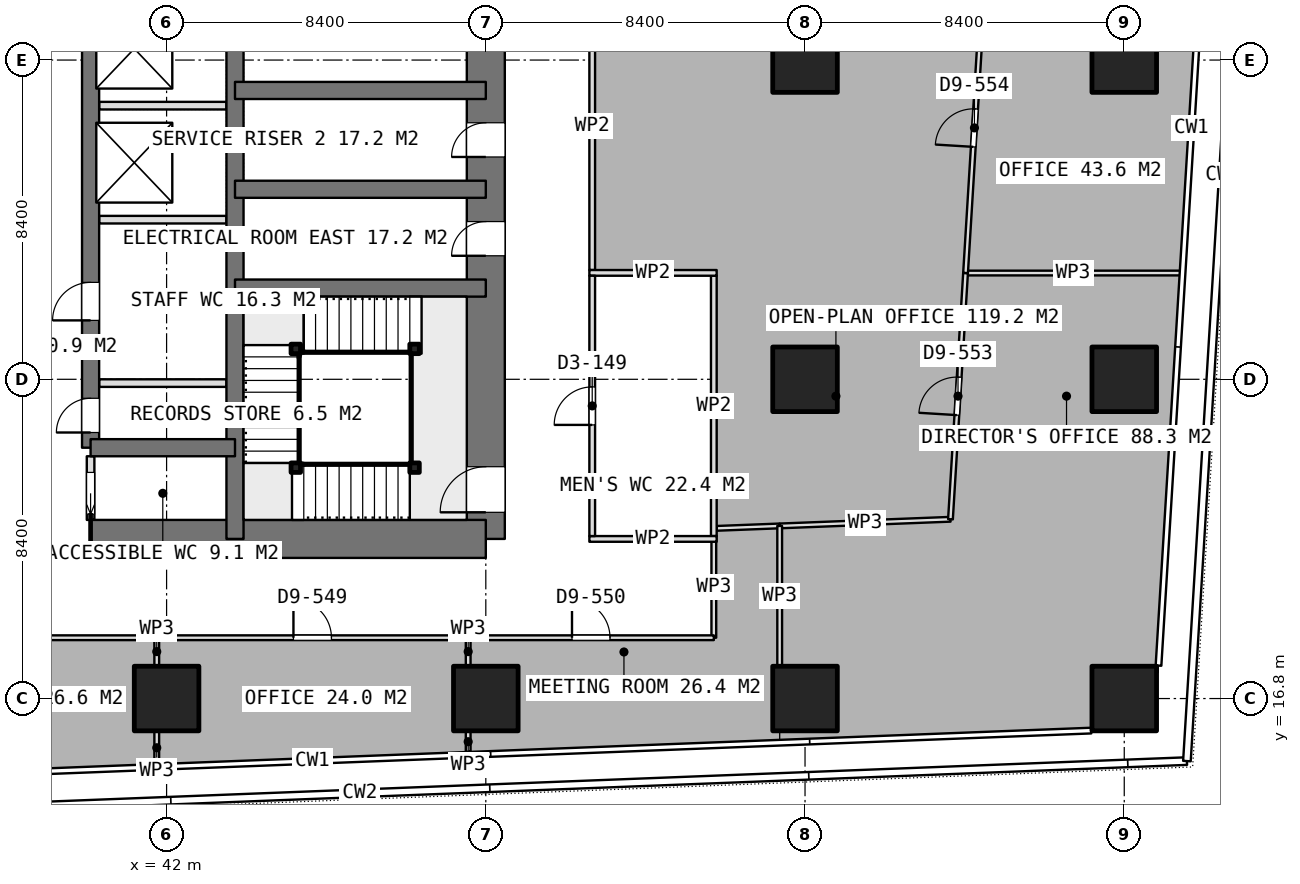
"""IFC4 building model, lengths in metres.
Left out: names, types, materials, properties, quantities, classifications, styles, units other than length and angle.
Written with IfcOpenShell. Run it as: python <this file> out.ifc"""

import sys

from ifc_helpers import new_model, si_unit, direction, frame, frame_2d, origin, origin_2d, place, context, subcontext, project, spatial, rectangle, extrude, element, fill, save


model = new_model("IFC4")
c1 = context("Model", 3, precision=1e-05, world=origin(), true_north=direction((0.0, 1.0)))
c2 = subcontext(c1, "Body", "Model", "MODEL_VIEW")
j1 = project(units=[si_unit("LENGTHUNIT", "METRE"), si_unit("PLANEANGLEUNIT", "RADIAN")], contexts=[c1])
p1 = place(None, origin())
s1 = spatial("IfcSite", under=j1, at=p1, CompositionType="ELEMENT")
p2 = place(p1, origin())
s2 = spatial("IfcBuilding", under=s1, at=p2, CompositionType="ELEMENT")
p3 = place(p2, frame((0.0, 0.0, 140.3)))
s3 = spatial("IfcBuildingStorey", under=s2, at=p3, CompositionType="ELEMENT", Elevation=140.3)
p4 = place(p3, frame((40.0, 21.0, 0.0), z_axis=(0.0, 0.0, 1.0), x_axis=(1.0, 0.0, 0.0)))
e1 = element("IfcWall", 1, at=p4, inside=s3, PredefinedType="SHEAR", context=c2, shape_type="SweptSolid", body=[
    extrude(rectangle(XDim=10.4, YDim=1.0, at=frame_2d((5.2, 0.0))), origin(), (0.0, 0.0, 1.0), 3.75),
])
p5 = place(p3, frame((50.4, 21.0, 0.0), z_axis=(0.0, 0.0, 1.0), x_axis=(0.0, 1.0, 0.0)))
e2 = element("IfcWall", 2, at=p5, inside=s3, PredefinedType="SHEAR", context=c2, shape_type="SweptSolid", body=[
    extrude(rectangle(XDim=25.2, YDim=1.0, at=frame_2d((12.6, 0.0))), origin(), (0.0, 0.0, 1.0), 3.75),
])
p6 = place(p5, frame((16.2, 0.0, 0.0)))
e3 = element("IfcOpeningElement", 3, at=p6, cuts=e2, PredefinedType="OPENING", context=c2, shape_type="SweptSolid", body=[
    extrude(rectangle(XDim=1.2, YDim=2.1, at=frame_2d((0.6, 1.05))), frame((0.0, 0.51, 0.0), z_axis=(0.0, -1.0, 0.0), x_axis=(1.0, 0.0, 0.0)), (0.0, 0.0, 1.0), 1.02),
])
p7 = place(p5, frame((10.05, 0.0, 0.0)))
e4 = element("IfcOpeningElement", 4, at=p7, cuts=e2, PredefinedType="OPENING", context=c2, shape_type="SweptSolid", body=[
    extrude(rectangle(XDim=0.9, YDim=2.1, at=frame_2d((0.45, 1.05))), frame((0.0, 0.51, 0.0), z_axis=(0.0, -1.0, 0.0), x_axis=(1.0, 0.0, 0.0)), (0.0, 0.0, 1.0), 1.02),
])
p8 = place(p5, frame((7.45, 0.0, 0.0)))
e5 = element("IfcOpeningElement", 5, at=p8, cuts=e2, PredefinedType="OPENING", context=c2, shape_type="SweptSolid", body=[
    extrude(rectangle(XDim=0.9, YDim=2.1, at=frame_2d((0.45, 1.05))), frame((0.0, 0.51, 0.0), z_axis=(0.0, -1.0, 0.0), x_axis=(1.0, 0.0, 0.0)), (0.0, 0.0, 1.0), 1.02),
])
p9 = place(p5, frame((0.7, 0.0, 0.0)))
e6 = element("IfcOpeningElement", 6, at=p9, cuts=e2, PredefinedType="OPENING", context=c2, shape_type="SweptSolid", body=[
    extrude(rectangle(XDim=1.2, YDim=2.1, at=frame_2d((0.6, 1.05))), frame((0.0, 0.51, 0.0), z_axis=(0.0, -1.0, 0.0), x_axis=(1.0, 0.0, 0.0)), (0.0, 0.0, 1.0), 1.02),
])
p10 = place(p3, frame((43.8, 21.0, 0.0), z_axis=(0.0, 0.0, 1.0), x_axis=(0.0, 1.0, 0.0)))
e7 = element("IfcWall", 7, at=p10, inside=s3, PredefinedType="SHEAR", context=c2, shape_type="SweptSolid", body=[
    extrude(rectangle(XDim=25.2, YDim=0.45, at=frame_2d((12.6, 0.0))), origin(), (0.0, 0.0, 1.0), 3.75),
])
p11 = place(p3, frame((40.0, 23.4, 0.0), z_axis=(0.0, 0.0, 1.0), x_axis=(0.0, 1.0, 0.0)))
e8 = element("IfcWall", 8, at=p11, inside=s3, PredefinedType="SHEAR", context=c2, shape_type="SweptSolid", body=[
    extrude(rectangle(XDim=18.0, YDim=0.45, at=frame_2d((9.0, 0.0))), origin(), (0.0, 0.0, 1.0), 3.75),
])
p12 = place(p11, frame((0.4, 0.0, 0.0)))
e9 = element("IfcOpeningElement", 9, at=p12, cuts=e8, PredefinedType="OPENING", context=c2, shape_type="SweptSolid", body=[
    extrude(rectangle(XDim=0.9, YDim=2.1, at=frame_2d((0.45, 1.05))), frame((0.0, 0.235, 0.0), z_axis=(0.0, -1.0, 0.0), x_axis=(1.0, 0.0, 0.0)), (0.0, 0.0, 1.0), 0.47),
])
p13 = place(p11, frame((3.35, 0.0, 0.0)))
e10 = element("IfcOpeningElement", 10, at=p13, cuts=e8, PredefinedType="OPENING", context=c2, shape_type="SweptSolid", body=[
    extrude(rectangle(XDim=1.0, YDim=2.1, at=frame_2d((0.5, 1.05))), frame((0.0, 0.235, 0.0), z_axis=(0.0, -1.0, 0.0), x_axis=(1.0, 0.0, 0.0)), (0.0, 0.0, 1.0), 0.47),
])
p14 = place(p3, frame((40.0, 23.4, 0.0), z_axis=(0.0, 0.0, 1.0), x_axis=(1.0, 0.0, 0.0)))
e11 = element("IfcWall", 11, at=p14, inside=s3, PredefinedType="SHEAR", context=c2, shape_type="SweptSolid", body=[
    extrude(rectangle(XDim=3.8, YDim=0.45, at=frame_2d((1.9, 0.0))), origin(), (0.0, 0.0, 1.0), 3.75),
])
for number, where, z_axis, x_axis in (
    (12, (43.8, 27.6, 0.0), (0.0, 0.0, 1.0), (1.0, 0.0, 0.0)),
    (13, (43.8, 30.2, 0.0), (0.0, 0.0, 1.0), (1.0, 0.0, 0.0)),
    (14, (43.8, 32.8, 0.0), (0.0, 0.0, 1.0), (1.0, 0.0, 0.0)),
):
    element("IfcWall", number, at=place(p3, frame(where, z_axis=z_axis, x_axis=x_axis)), inside=s3, PredefinedType="SHEAR", context=c2, shape_type="SweptSolid", body=[
        extrude(rectangle(XDim=6.6, YDim=0.45, at=frame_2d((3.3, 0.0))), origin(), (0.0, 0.0, 1.0), 3.75),
    ])
for number, where, z_axis, x_axis in (
    (15, (42.0, 16.8, 0.0), (0.0, 0.0, 1.0), (1.0, 0.0, 0.0)),
    (16, (50.4, 16.8, 0.0), (0.0, 0.0, 1.0), (1.0, 0.0, 0.0)),
    (17, (58.8, 16.8, 0.0), (0.0, 0.0, 1.0), (1.0, 0.0, 0.0)),
    (18, (58.8, 25.2, 0.0), (0.0, 0.0, 1.0), (1.0, 0.0, 0.0)),
    (19, (58.8, 33.6, 0.0), (0.0, 0.0, 1.0), (1.0, 0.0, 0.0)),
    (20, (67.2, 16.8, 0.0), (0.0, 0.0, 1.0), (1.0, 0.0, 0.0)),
    (21, (67.2, 25.2, 0.0), (0.0, 0.0, 1.0), (1.0, 0.0, 0.0)),
    (22, (67.2, 33.6, 0.0), (0.0, 0.0, 1.0), (1.0, 0.0, 0.0)),
):
    element("IfcColumn", number, at=place(p3, frame(where, z_axis=z_axis, x_axis=x_axis)), inside=s3, PredefinedType="COLUMN", context=c2, shape_type="SweptSolid", body=[
        extrude(rectangle(XDim=1.7, YDim=1.7, at=origin_2d()), origin(), (0.0, 0.0, 1.0), 3.75),
    ])
for number, where, z_axis, x_axis in (
    (23, (40.225, 29.4, 0.0), (0.0, 0.0, 1.0), (1.0, 0.0, 0.0)),
    (24, (40.225, 32.4, 0.0), (0.0, 0.0, 1.0), (1.0, 0.0, 0.0)),
):
    element("IfcWall", number, at=place(p3, frame(where, z_axis=z_axis, x_axis=x_axis)), inside=s3, PredefinedType="PARTITIONING", context=c2, shape_type="SweptSolid", body=[
        extrude(rectangle(XDim=3.35, YDim=0.2, at=frame_2d((1.675, 0.0))), origin(), (0.0, 0.0, 1.0), 3.5),
    ])
p15 = place(p3, frame((40.0, 21.5, 0.0), z_axis=(0.0, 0.0, 1.0), x_axis=(0.0, 1.0, 0.0)))
e25 = element("IfcWall", 25, at=p15, inside=s3, PredefinedType="PARTITIONING", context=c2, shape_type="SweptSolid", body=[
    extrude(rectangle(XDim=1.675, YDim=0.2, at=frame_2d((0.837, 0.0))), origin(), (0.0, 0.0, 1.0), 3.5),
])
p16 = place(p15, frame((0.15, 0.0, 0.0)))
e26 = element("IfcOpeningElement", 26, at=p16, cuts=e25, PredefinedType="OPENING", context=c2, shape_type="SweptSolid", body=[
    extrude(rectangle(XDim=1.1, YDim=2.1, at=frame_2d((0.55, 1.05))), frame((0.0, 0.11, 0.0), z_axis=(0.0, -1.0, 0.0), x_axis=(1.0, 0.0, 0.0)), (0.0, 0.0, 1.0), 0.22),
])
p17 = place(p3, frame((40.225, 25.1, 0.0), z_axis=(0.0, 0.0, 1.0), x_axis=(1.0, 0.0, 0.0)))
e27 = element("IfcWall", 27, at=p17, inside=s3, PredefinedType="PARTITIONING", context=c2, shape_type="SweptSolid", body=[
    extrude(rectangle(XDim=3.35, YDim=0.2, at=frame_2d((1.675, 0.0))), origin(), (0.0, 0.0, 1.0), 3.5),
])
for number, where, z_axis, x_axis in (
    (28, (53.125, 21.0, 0.0), (0.0, 0.0, 1.0), (1.0, 0.0, 0.0)),
    (29, (53.125, 28.0, 0.0), (0.0, 0.0, 1.0), (1.0, 0.0, 0.0)),
):
    element("IfcWall", number, at=place(p3, frame(where, z_axis=z_axis, x_axis=x_axis)), inside=s3, PredefinedType="PARTITIONING", context=c2, shape_type="SweptSolid", body=[
        extrude(rectangle(XDim=3.35, YDim=0.15, at=frame_2d((1.675, 0.0))), origin(), (0.0, 0.0, 1.0), 3.5),
    ])
p18 = place(p3, frame((53.2, 21.075, 0.0), z_axis=(0.0, 0.0, 1.0), x_axis=(0.0, 1.0, 0.0)))
e30 = element("IfcWall", 30, at=p18, inside=s3, PredefinedType="PARTITIONING", context=c2, shape_type="SweptSolid", body=[
    extrude(rectangle(XDim=6.85, YDim=0.15, at=frame_2d((3.425, 0.0))), origin(), (0.0, 0.0, 1.0), 3.5),
])
p19 = place(p18, frame((2.925, 0.0, 0.0)))
e31 = element("IfcOpeningElement", 31, at=p19, cuts=e30, PredefinedType="OPENING", context=c2, shape_type="SweptSolid", body=[
    extrude(rectangle(XDim=1.0, YDim=2.1, at=frame_2d((0.5, 1.05))), frame((0.0, 0.085, 0.0), z_axis=(0.0, -1.0, 0.0), x_axis=(1.0, 0.0, 0.0)), (0.0, 0.0, 1.0), 0.17),
])
p20 = place(p3, frame((56.4, 21.075, 0.0), z_axis=(0.0, 0.0, 1.0), x_axis=(0.0, 1.0, 0.0)))
e32 = element("IfcWall", 32, at=p20, inside=s3, PredefinedType="PARTITIONING", context=c2, shape_type="SweptSolid", body=[
    extrude(rectangle(XDim=6.85, YDim=0.15, at=frame_2d((3.425, 0.0))), origin(), (0.0, 0.0, 1.0), 3.5),
])
p21 = place(p3, frame((41.741, 15.08, 0.0), z_axis=(0.0, 0.0, 1.0), x_axis=(0.0, 1.0, 0.0)))
e33 = element("IfcWall", 33, at=p21, inside=s3, PredefinedType="PARTITIONING", context=c2, shape_type="SweptSolid", body=[
    extrude(rectangle(XDim=0.85, YDim=0.125, at=frame_2d((0.425, 0.0))), origin(), (0.0, 0.0, 1.0), 3.5),
])
p22 = place(p3, frame((41.741, 17.67, 0.0), z_axis=(0.0, 0.0, 1.0), x_axis=(0.0, 1.0, 0.0)))
e34 = element("IfcWall", 34, at=p22, inside=s3, PredefinedType="PARTITIONING", context=c2, shape_type="SweptSolid", body=[
    extrude(rectangle(XDim=0.73, YDim=0.125, at=frame_2d((0.365, 0.0))), origin(), (0.0, 0.0, 1.0), 3.5),
])
p23 = place(p3, frame((41.741, 18.4, 0.0), z_axis=(0.0, 0.0, 1.0), x_axis=(1.0, 0.0, 0.0)))
e35 = element("IfcWall", 35, at=p23, inside=s3, PredefinedType="PARTITIONING", context=c2, shape_type="SweptSolid", body=[
    extrude(rectangle(XDim=8.195, YDim=0.125, at=frame_2d((4.098, 0.0))), origin(), (0.0, 0.0, 1.0), 3.5),
])
p24 = place(p23, frame((3.597, 0.0, 0.0)))
e36 = element("IfcOpeningElement", 36, at=p24, cuts=e35, PredefinedType="OPENING", context=c2, shape_type="SweptSolid", body=[
    extrude(rectangle(XDim=1.0, YDim=2.1, at=frame_2d((0.5, 1.05))), frame((0.0, 0.073, 0.0), z_axis=(0.0, -1.0, 0.0), x_axis=(1.0, 0.0, 0.0)), (0.0, 0.0, 1.0), 0.145),
])
p25 = place(p3, frame((49.936, 18.4, 0.0), z_axis=(0.0, 0.0, 1.0), x_axis=(0.0, -1.0, 0.0)))
e37 = element("IfcWall", 37, at=p25, inside=s3, PredefinedType="PARTITIONING", context=c2, shape_type="SweptSolid", body=[
    extrude(rectangle(XDim=0.73, YDim=0.125, at=frame_2d((0.365, 0.0))), origin(), (0.0, 0.0, 1.0), 3.5),
])
p26 = place(p3, frame((49.936, 15.93, 0.0), z_axis=(0.0, 0.0, 1.0), x_axis=(0.0, -1.0, 0.0)))
e38 = element("IfcWall", 38, at=p26, inside=s3, PredefinedType="PARTITIONING", context=c2, shape_type="SweptSolid", body=[
    extrude(rectangle(XDim=0.531, YDim=0.125, at=frame_2d((0.266, 0.0))), origin(), (0.0, 0.0, 1.0), 3.5),
])
p27 = place(p3, frame((56.475, 21.278, 0.0), z_axis=(0.0, 0.0, 1.0), x_axis=(0.999256603287, 0.038551793559, 0.0)))
e39 = element("IfcWall", 39, at=p27, inside=s3, PredefinedType="PARTITIONING", context=c2, shape_type="SweptSolid", body=[
    extrude(rectangle(XDim=1.659, YDim=0.125, at=frame_2d((0.83, 0.0))), origin(), (0.0, 0.0, 1.0), 3.5),
])
p28 = place(p3, frame((58.133, 21.342, 0.0), z_axis=(0.0, 0.0, 1.0), x_axis=(0.0, -1.0, 0.0)))
e40 = element("IfcWall", 40, at=p28, inside=s3, PredefinedType="PARTITIONING", context=c2, shape_type="SweptSolid", body=[
    extrude(rectangle(XDim=3.672, YDim=0.125, at=frame_2d((1.836, 0.0))), origin(), (0.0, 0.0, 1.0), 3.5),
])
p29 = place(p3, frame((49.937, 18.4, 0.0), z_axis=(0.0, 0.0, 1.0), x_axis=(1.0, 0.0, 0.0)))
e41 = element("IfcWall", 41, at=p29, inside=s3, PredefinedType="PARTITIONING", context=c2, shape_type="SweptSolid", body=[
    extrude(rectangle(XDim=6.463, YDim=0.125, at=frame_2d((3.231, 0.0))), origin(), (0.0, 0.0, 1.0), 3.5),
])
p30 = place(p29, frame((2.731, 0.0, 0.0)))
e42 = element("IfcOpeningElement", 42, at=p30, cuts=e41, PredefinedType="OPENING", context=c2, shape_type="SweptSolid", body=[
    extrude(rectangle(XDim=1.0, YDim=2.1, at=frame_2d((0.5, 1.05))), frame((0.0, 0.073, 0.0), z_axis=(0.0, -1.0, 0.0), x_axis=(1.0, 0.0, 0.0)), (0.0, 0.0, 1.0), 0.145),
])
p31 = place(p3, frame((56.4, 18.4, 0.0), z_axis=(0.0, 0.0, 1.0), x_axis=(0.0, 1.0, 0.0)))
e43 = element("IfcWall", 43, at=p31, inside=s3, PredefinedType="PARTITIONING", context=c2, shape_type="SweptSolid", body=[
    extrude(rectangle(XDim=2.674, YDim=0.125, at=frame_2d((1.337, 0.0))), origin(), (0.0, 0.0, 1.0), 3.5),
])
p32 = place(p3, frame((63.024, 27.996, 0.0), z_axis=(0.0, 0.0, 1.0), x_axis=(1.0, 0.0, 0.0)))
e44 = element("IfcWall", 44, at=p32, inside=s3, PredefinedType="PARTITIONING", context=c2, shape_type="SweptSolid", body=[
    extrude(rectangle(XDim=5.66, YDim=0.125, at=frame_2d((2.83, 0.0))), origin(), (0.0, 0.0, 1.0), 3.5),
])
p33 = place(p3, frame((58.134, 21.342, 0.0), z_axis=(0.0, 0.0, 1.0), x_axis=(0.999241881709, 0.038931501885, 0.0)))
e45 = element("IfcWall", 45, at=p33, inside=s3, PredefinedType="PARTITIONING", context=c2, shape_type="SweptSolid", body=[
    extrude(rectangle(XDim=4.496, YDim=0.125, at=frame_2d((2.248, 0.0))), origin(), (0.0, 0.0, 1.0), 3.5),
])
p34 = place(p3, frame((62.627, 21.517, 0.0), z_axis=(0.0, 0.0, 1.0), x_axis=(0.061155945859, 0.998128223369, 0.0)))
e46 = element("IfcWall", 46, at=p34, inside=s3, PredefinedType="PARTITIONING", context=c2, shape_type="SweptSolid", body=[
    extrude(rectangle(XDim=6.491, YDim=0.125, at=frame_2d((3.246, 0.0))), origin(), (0.0, 0.0, 1.0), 3.5),
])
p35 = place(p34, frame((2.746, 0.0, 0.0)))
e47 = element("IfcOpeningElement", 47, at=p35, cuts=e46, PredefinedType="OPENING", context=c2, shape_type="SweptSolid", body=[
    extrude(rectangle(XDim=1.0, YDim=2.1, at=frame_2d((0.5, 1.05))), frame((0.0, 0.073, 0.0), z_axis=(0.0, -1.0, 0.0), x_axis=(1.0, 0.0, 0.0)), (0.0, 0.0, 1.0), 0.145),
])
p36 = place(p3, frame((63.024, 27.997, 0.0), z_axis=(0.0, 0.0, 1.0), x_axis=(0.061176245149, 0.998126979412, 0.0)))
e48 = element("IfcWall", 48, at=p36, inside=s3, PredefinedType="PARTITIONING", context=c2, shape_type="SweptSolid", body=[
    extrude(rectangle(XDim=7.65, YDim=0.125, at=frame_2d((3.825, 0.0))), origin(), (0.0, 0.0, 1.0), 3.5),
])
p37 = place(p36, frame((3.325, 0.0, 0.0)))
e49 = element("IfcOpeningElement", 49, at=p37, cuts=e48, PredefinedType="OPENING", context=c2, shape_type="SweptSolid", body=[
    extrude(rectangle(XDim=1.0, YDim=2.1, at=frame_2d((0.5, 1.05))), frame((0.0, 0.073, 0.0), z_axis=(0.0, -1.0, 0.0), x_axis=(1.0, 0.0, 0.0)), (0.0, 0.0, 1.0), 0.145),
])
p38 = place(p3, frame((53.2, 28.075, 0.0), z_axis=(0.0, 0.0, 1.0), x_axis=(0.0, 1.0, 0.0)))
e50 = element("IfcWall", 50, at=p38, inside=s3, PredefinedType="PARTITIONING", context=c2, shape_type="SweptSolid", body=[
    extrude(rectangle(XDim=7.562, YDim=0.15, at=frame_2d((3.781, 0.0))), origin(), (0.0, 0.0, 1.0), 3.5),
])
p39 = place(p3, frame((33.544, 18.4, 0.0), z_axis=(0.0, 0.0, 1.0), x_axis=(1.0, 0.0, 0.0)))
e51 = element("IfcWall", 51, at=p39, inside=s3, PredefinedType="PARTITIONING", context=c2, shape_type="SweptSolid", body=[
    extrude(rectangle(XDim=8.196, YDim=0.125, at=frame_2d((4.098, 0.0))), origin(), (0.0, 0.0, 1.0), 3.5),
])
p40 = place(p39, frame((3.598, 0.0, 0.0)))
e52 = element("IfcOpeningElement", 52, at=p40, cuts=e51, PredefinedType="OPENING", context=c2, shape_type="SweptSolid", body=[
    extrude(rectangle(XDim=1.0, YDim=2.1, at=frame_2d((0.5, 1.05))), frame((0.0, 0.073, 0.0), z_axis=(0.0, -1.0, 0.0), x_axis=(1.0, 0.0, 0.0)), (0.0, 0.0, 1.0), 0.145),
])
for number, where, z_axis, x_axis in (
    (53, (48.525, 22.875, 0.0), (0.0, 0.0, 1.0), (1.0, 0.0, 0.0)),
    (54, (45.4, 22.875, 0.0), (0.0, 0.0, 1.0), (1.0, 0.0, 0.0)),
    (55, (45.4, 26.0, 0.0), (0.0, 0.0, 1.0), (1.0, 0.0, 0.0)),
    (56, (48.525, 26.0, 0.0), (0.0, 0.0, 1.0), (1.0, 0.0, 0.0)),
):
    element("IfcColumn", number, at=place(p3, frame(where, z_axis=z_axis, x_axis=x_axis)), inside=s3, PredefinedType="COLUMN", context=c2, shape_type="SweptSolid", body=[
        extrude(rectangle(XDim=0.25, YDim=0.25, at=origin_2d()), origin(), (0.0, 0.0, 1.0), 3.75),
    ])
p41 = place(p7, origin())
e57 = element("IfcDoor", 57, at=p41, inside=s3, OperationType="SINGLE_SWING_LEFT", PredefinedType="DOOR", context=c2, shape_type="SweptSolid", body=[
    extrude(rectangle(XDim=0.9, YDim=2.1, at=frame_2d((0.45, 1.05))), frame((0.0, 0.025, 0.0), z_axis=(0.0, -1.0, 0.0), x_axis=(1.0, 0.0, 0.0)), (0.0, 0.0, 1.0), 0.05),
])
fill(e4, e57)
p42 = place(p8, origin())
e58 = element("IfcDoor", 58, at=p42, inside=s3, OperationType="SINGLE_SWING_LEFT", PredefinedType="DOOR", context=c2, shape_type="SweptSolid", body=[
    extrude(rectangle(XDim=0.9, YDim=2.1, at=frame_2d((0.45, 1.05))), frame((0.0, 0.025, 0.0), z_axis=(0.0, -1.0, 0.0), x_axis=(1.0, 0.0, 0.0)), (0.0, 0.0, 1.0), 0.05),
])
fill(e5, e58)
p43 = place(p16, origin())
e59 = element("IfcDoor", 59, at=p43, inside=s3, OperationType="SLIDING_TO_LEFT", PredefinedType="DOOR", context=c2, shape_type="SweptSolid", body=[
    extrude(rectangle(XDim=1.1, YDim=2.1, at=frame_2d((0.55, 1.05))), frame((0.0, 0.025, 0.0), z_axis=(0.0, -1.0, 0.0), x_axis=(1.0, 0.0, 0.0)), (0.0, 0.0, 1.0), 0.05),
])
fill(e26, e59)
p44 = place(p12, origin())
e60 = element("IfcDoor", 60, at=p44, inside=s3, OperationType="SINGLE_SWING_LEFT", PredefinedType="DOOR", context=c2, shape_type="SweptSolid", body=[
    extrude(rectangle(XDim=0.9, YDim=2.1, at=frame_2d((0.45, 1.05))), frame((0.0, 0.025, 0.0), z_axis=(0.0, -1.0, 0.0), x_axis=(1.0, 0.0, 0.0)), (0.0, 0.0, 1.0), 0.05),
])
fill(e9, e60)
p45 = place(p13, origin())
e61 = element("IfcDoor", 61, at=p45, inside=s3, OperationType="SINGLE_SWING_LEFT", PredefinedType="DOOR", context=c2, shape_type="SweptSolid", body=[
    extrude(rectangle(XDim=1.0, YDim=2.1, at=frame_2d((0.5, 1.05))), frame((0.0, 0.025, 0.0), z_axis=(0.0, -1.0, 0.0), x_axis=(1.0, 0.0, 0.0)), (0.0, 0.0, 1.0), 0.05),
])
fill(e10, e61)
p46 = place(p19, origin())
e62 = element("IfcDoor", 62, at=p46, inside=s3, OperationType="SINGLE_SWING_LEFT", PredefinedType="DOOR", context=c2, shape_type="SweptSolid", body=[
    extrude(rectangle(XDim=1.0, YDim=2.1, at=frame_2d((0.5, 1.05))), frame((0.0, 0.025, 0.0), z_axis=(0.0, -1.0, 0.0), x_axis=(1.0, 0.0, 0.0)), (0.0, 0.0, 1.0), 0.05),
])
fill(e31, e62)
p47 = place(p24, origin())
e63 = element("IfcDoor", 63, at=p47, inside=s3, OperationType="SINGLE_SWING_LEFT", PredefinedType="DOOR", context=c2, shape_type="SweptSolid", body=[
    extrude(rectangle(XDim=1.0, YDim=2.1, at=frame_2d((0.5, 1.05))), frame((0.0, 0.025, 0.0), z_axis=(0.0, -1.0, 0.0), x_axis=(1.0, 0.0, 0.0)), (0.0, 0.0, 1.0), 0.05),
])
fill(e36, e63)
p48 = place(p30, origin())
e64 = element("IfcDoor", 64, at=p48, inside=s3, OperationType="SINGLE_SWING_LEFT", PredefinedType="DOOR", context=c2, shape_type="SweptSolid", body=[
    extrude(rectangle(XDim=1.0, YDim=2.1, at=frame_2d((0.5, 1.05))), frame((0.0, 0.025, 0.0), z_axis=(0.0, -1.0, 0.0), x_axis=(1.0, 0.0, 0.0)), (0.0, 0.0, 1.0), 0.05),
])
fill(e42, e64)
p49 = place(p35, origin())
e65 = element("IfcDoor", 65, at=p49, inside=s3, OperationType="SINGLE_SWING_LEFT", PredefinedType="DOOR", context=c2, shape_type="SweptSolid", body=[
    extrude(rectangle(XDim=1.0, YDim=2.1, at=frame_2d((0.5, 1.05))), frame((0.0, 0.025, 0.0), z_axis=(0.0, -1.0, 0.0), x_axis=(1.0, 0.0, 0.0)), (0.0, 0.0, 1.0), 0.05),
])
fill(e47, e65)
p50 = place(p37, origin())
e66 = element("IfcDoor", 66, at=p50, inside=s3, OperationType="SINGLE_SWING_LEFT", PredefinedType="DOOR", context=c2, shape_type="SweptSolid", body=[
    extrude(rectangle(XDim=1.0, YDim=2.1, at=frame_2d((0.5, 1.05))), frame((0.0, 0.025, 0.0), z_axis=(0.0, -1.0, 0.0), x_axis=(1.0, 0.0, 0.0)), (0.0, 0.0, 1.0), 0.05),
])
fill(e49, e66)
p51 = place(p9, origin())
e67 = element("IfcDoor", 67, at=p51, inside=s3, OperationType="SINGLE_SWING_RIGHT", PredefinedType="DOOR", context=c2, shape_type="SweptSolid", body=[
    extrude(rectangle(XDim=1.2, YDim=2.1, at=frame_2d((0.6, 1.05))), frame((0.0, 0.025, 0.0), z_axis=(0.0, -1.0, 0.0), x_axis=(1.0, 0.0, 0.0)), (0.0, 0.0, 1.0), 0.05),
])
fill(e6, e67)
save(model, sys.argv[1])
